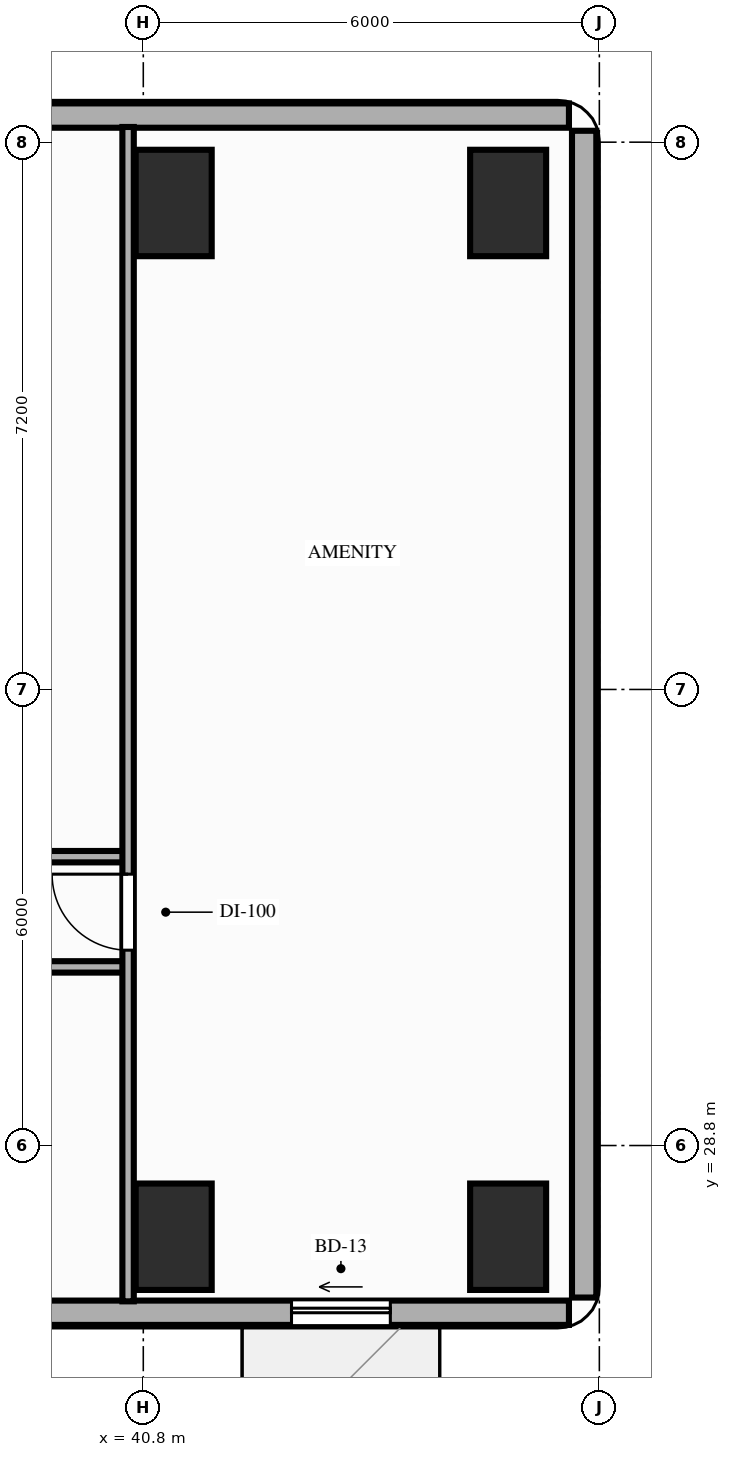
"""IFC4 building model, lengths in metres.
Left out: names, types, materials, properties, quantities, classifications, styles, units other than length and angle.
Written with IfcOpenShell. Run it as: python <this file> out.ifc"""

import sys

from ifc_helpers import new_model, si_unit, direction, frame, frame_2d, origin, origin_2d, place, context, subcontext, project, spatial, rectangle, extrude, element, fill, save


model = new_model("IFC4")
c1 = context("Model", 3, precision=1e-05, world=origin(), true_north=direction((0.0, 1.0)))
c2 = subcontext(c1, "Body", "Model", "MODEL_VIEW")
j1 = project(units=[si_unit("LENGTHUNIT", "METRE"), si_unit("PLANEANGLEUNIT", "RADIAN")], contexts=[c1])
p1 = place(None, origin())
s1 = spatial("IfcSite", under=j1, at=p1, CompositionType="ELEMENT")
p2 = place(p1, origin())
s2 = spatial("IfcBuilding", under=s1, at=p2, CompositionType="ELEMENT")
p3 = place(p2, frame((0.0, 0.0, 62.8)))
s3 = spatial("IfcBuildingStorey", under=s2, at=p3, CompositionType="ELEMENT", Elevation=62.8)
for number, where, z_axis, x_axis in (
    (1, (41.2, 27.6, 0.0), (0.0, 0.0, 1.0), (1.0, 0.0, 0.0)),
    (2, (41.2, 41.2, 0.0), (0.0, 0.0, 1.0), (1.0, 0.0, 0.0)),
    (3, (45.6, 27.6, 0.0), (0.0, 0.0, 1.0), (1.0, 0.0, 0.0)),
    (4, (45.6, 41.2, 0.0), (0.0, 0.0, 1.0), (1.0, 0.0, 0.0)),
):
    element("IfcColumn", number, at=place(p3, frame(where, z_axis=z_axis, x_axis=x_axis)), inside=s3, PredefinedType="COLUMN", context=c2, shape_type="SweptSolid", body=[
        extrude(rectangle(XDim=1.0, YDim=1.4, at=origin_2d()), origin(), (0.0, 0.0, 1.0), 3.2),
    ])
p4 = place(p3, frame((46.4, 42.35, 0.0), z_axis=(0.0, 0.0, 1.0), x_axis=(-1.0, 0.0, 0.0)))
e5 = element("IfcWall", 5, at=p4, inside=s3, PredefinedType="STANDARD", context=c2, shape_type="SweptSolid", body=[
    extrude(rectangle(XDim=19.05, YDim=0.32, at=frame_2d((9.525, 0.0))), origin(), (0.0, 0.0, 1.0), 2.4),
])
p5 = place(p3, frame((20.25, 26.6, 0.0), z_axis=(0.0, 0.0, 1.0), x_axis=(1.0, 0.0, 0.0)))
e6 = element("IfcWall", 6, at=p5, inside=s3, PredefinedType="STANDARD", context=c2, shape_type="SweptSolid", body=[
    extrude(rectangle(XDim=26.15, YDim=0.32, at=frame_2d((13.075, 0.0))), origin(), (0.0, 0.0, 1.0), 3.02),
])
p6 = place(p5, frame((8.0, 0.0, 0.0)))
e7 = element("IfcOpeningElement", 7, at=p6, cuts=e6, PredefinedType="OPENING", context=c2, shape_type="SweptSolid", body=[
    extrude(rectangle(XDim=1.3, YDim=2.08, at=frame_2d((0.65, 1.04))), frame((0.0, 0.17, 0.0), z_axis=(0.0, -1.0, 0.0), x_axis=(1.0, 0.0, 0.0)), (0.0, 0.0, 1.0), 0.34),
])
p7 = place(p5, frame((22.5, 0.0, 0.0)))
e8 = element("IfcOpeningElement", 8, at=p7, cuts=e6, PredefinedType="OPENING", context=c2, shape_type="SweptSolid", body=[
    extrude(rectangle(XDim=1.3, YDim=2.08, at=frame_2d((0.65, 1.04))), frame((0.0, 0.17, 0.0), z_axis=(0.0, -1.0, 0.0), x_axis=(1.0, 0.0, 0.0)), (0.0, 0.0, 1.0), 0.34),
])
p8 = place(p5, frame((1.95, 0.0, 0.85)))
e9 = element("IfcOpeningElement", 9, at=p8, cuts=e6, PredefinedType="OPENING", context=c2, shape_type="SweptSolid", body=[
    extrude(rectangle(XDim=2.4, YDim=1.8, at=frame_2d((1.2, 0.9))), frame((0.0, 0.17, 0.0), z_axis=(0.0, -1.0, 0.0), x_axis=(1.0, 0.0, 0.0)), (0.0, 0.0, 1.0), 0.34),
])
p9 = place(p3, frame((46.6, 26.8, 0.0), z_axis=(0.0, 0.0, 1.0), x_axis=(0.0, 1.0, 0.0)))
e10 = element("IfcWall", 10, at=p9, inside=s3, PredefinedType="STANDARD", context=c2, shape_type="SweptSolid", body=[
    extrude(rectangle(XDim=15.35, YDim=0.32, at=frame_2d((7.675, 0.0))), origin(), (0.0, 0.0, 1.0), 3.02),
])
p10 = place(p3, frame((27.15, 31.15, 0.0), z_axis=(0.0, 0.0, 1.0), x_axis=(1.0, 0.0, 0.0)))
e11 = element("IfcWall", 11, at=p10, inside=s3, PredefinedType="PARTITIONING", context=c2, shape_type="SweptSolid", body=[
    extrude(rectangle(XDim=13.45, YDim=0.15, at=frame_2d((6.725, 0.0))), origin(), (0.0, 0.0, 1.0), 2.4),
])
p11 = place(p10, frame((3.75, 0.0, 0.0)))
e12 = element("IfcOpeningElement", 12, at=p11, cuts=e11, PredefinedType="OPENING", context=c2, shape_type="SweptSolid", body=[
    extrude(rectangle(XDim=0.95, YDim=2.15, at=frame_2d((0.475, 1.075))), frame((0.0, 0.085, 0.0), z_axis=(0.0, -1.0, 0.0), x_axis=(1.0, 0.0, 0.0)), (0.0, 0.0, 1.0), 0.17),
])
p12 = place(p10, frame((10.48, 0.0, 0.0)))
e13 = element("IfcOpeningElement", 13, at=p12, cuts=e11, PredefinedType="OPENING", context=c2, shape_type="SweptSolid", body=[
    extrude(rectangle(XDim=0.95, YDim=2.15, at=frame_2d((0.475, 1.075))), frame((0.0, 0.085, 0.0), z_axis=(0.0, -1.0, 0.0), x_axis=(1.0, 0.0, 0.0)), (0.0, 0.0, 1.0), 0.17),
])
p13 = place(p3, frame((27.15, 32.6, 0.0), z_axis=(0.0, 0.0, 1.0), x_axis=(1.0, 0.0, 0.0)))
e14 = element("IfcWall", 14, at=p13, inside=s3, PredefinedType="PARTITIONING", context=c2, shape_type="SweptSolid", body=[
    extrude(rectangle(XDim=13.45, YDim=0.15, at=frame_2d((6.725, 0.0))), origin(), (0.0, 0.0, 1.0), 2.4),
])
p14 = place(p13, frame((2.15, 0.0, 0.0)))
e15 = element("IfcOpeningElement", 15, at=p14, cuts=e14, PredefinedType="OPENING", context=c2, shape_type="SweptSolid", body=[
    extrude(rectangle(XDim=0.95, YDim=2.15, at=frame_2d((0.475, 1.075))), frame((0.0, 0.085, 0.0), z_axis=(0.0, -1.0, 0.0), x_axis=(1.0, 0.0, 0.0)), (0.0, 0.0, 1.0), 0.17),
])
p15 = place(p13, frame((6.65, 0.0, 0.0)))
e16 = element("IfcOpeningElement", 16, at=p15, cuts=e14, PredefinedType="OPENING", context=c2, shape_type="SweptSolid", body=[
    extrude(rectangle(XDim=0.95, YDim=2.15, at=frame_2d((0.475, 1.075))), frame((0.0, 0.085, 0.0), z_axis=(0.0, -1.0, 0.0), x_axis=(1.0, 0.0, 0.0)), (0.0, 0.0, 1.0), 0.17),
])
p16 = place(p13, frame((10.75, 0.0, 0.0)))
e17 = element("IfcOpeningElement", 17, at=p16, cuts=e14, PredefinedType="OPENING", context=c2, shape_type="SweptSolid", body=[
    extrude(rectangle(XDim=0.95, YDim=2.15, at=frame_2d((0.475, 1.075))), frame((0.0, 0.085, 0.0), z_axis=(0.0, -1.0, 0.0), x_axis=(1.0, 0.0, 0.0)), (0.0, 0.0, 1.0), 0.17),
])
p17 = place(p3, frame((40.6, 26.75, 0.0), z_axis=(0.0, 0.0, 1.0), x_axis=(0.0, 1.0, 0.0)))
e18 = element("IfcWall", 18, at=p17, inside=s3, PredefinedType="PARTITIONING", context=c2, shape_type="SweptSolid", body=[
    extrude(rectangle(XDim=15.45, YDim=0.15, at=frame_2d((7.725, 0.0))), origin(), (0.0, 0.0, 1.0), 2.4),
])
p18 = place(p17, frame((4.62, 0.0, 0.0)))
e19 = element("IfcOpeningElement", 19, at=p18, cuts=e18, PredefinedType="OPENING", context=c2, shape_type="SweptSolid", body=[
    extrude(rectangle(XDim=1.0, YDim=2.15, at=frame_2d((0.5, 1.075))), frame((0.0, 0.085, 0.0), z_axis=(0.0, -1.0, 0.0), x_axis=(1.0, 0.0, 0.0)), (0.0, 0.0, 1.0), 0.17),
])
p19 = place(p7, origin())
e20 = element("IfcDoor", 20, at=p19, inside=s3, OperationType="SLIDING_TO_LEFT", PredefinedType="DOOR", context=c2, shape_type="SweptSolid", body=[
    extrude(rectangle(XDim=1.3, YDim=2.08, at=frame_2d((0.65, 1.04))), frame((0.0, 0.025, 0.0), z_axis=(0.0, -1.0, 0.0), x_axis=(1.0, 0.0, 0.0)), (0.0, 0.0, 1.0), 0.05),
])
fill(e8, e20)
p20 = place(p18, origin())
e21 = element("IfcDoor", 21, at=p20, inside=s3, OperationType="SINGLE_SWING_RIGHT", PredefinedType="DOOR", context=c2, shape_type="SweptSolid", body=[
    extrude(rectangle(XDim=1.0, YDim=2.15, at=frame_2d((0.5, 1.075))), frame((0.0, 0.025, 0.0), z_axis=(0.0, -1.0, 0.0), x_axis=(1.0, 0.0, 0.0)), (0.0, 0.0, 1.0), 0.05),
])
fill(e19, e21)
save(model, sys.argv[1])
